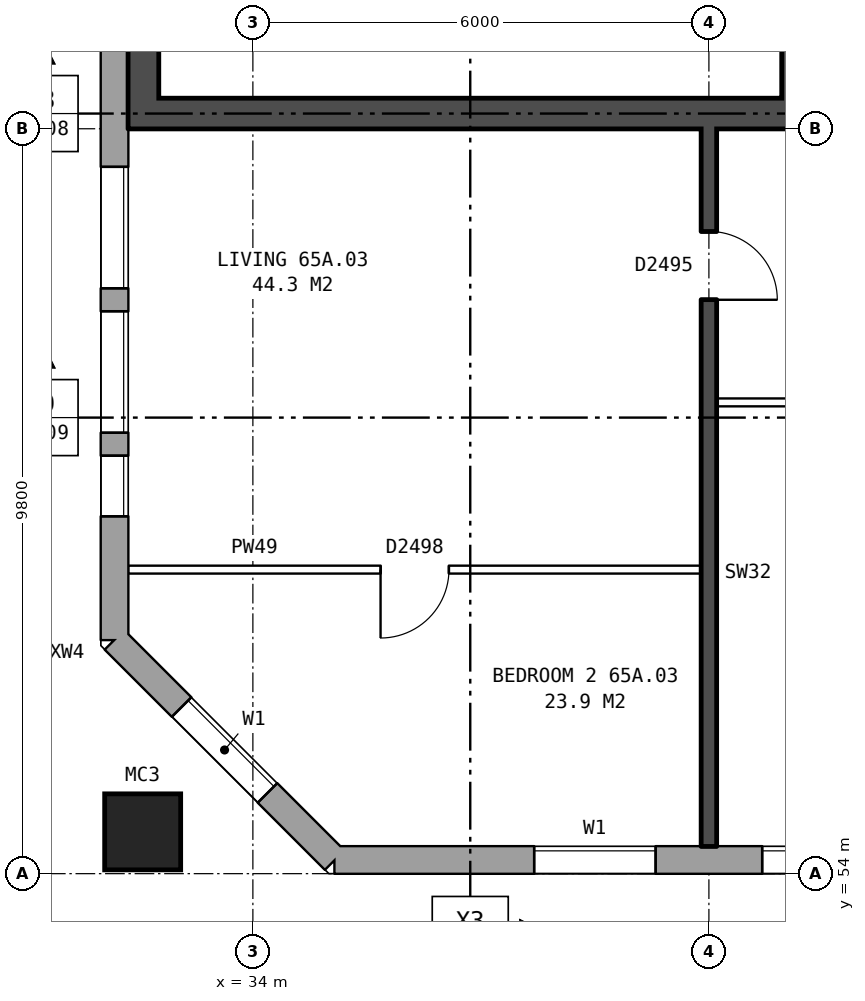
"""IFC4 building model, lengths in metres.
Left out: names, types, materials, properties, quantities, classifications, styles, units other than length and angle.
Written with IfcOpenShell. Run it as: python <this file> out.ifc"""

import sys

from ifc_helpers import new_model, si_unit, direction, frame, frame_2d, origin, origin_2d, place, context, subcontext, project, spatial, rectangle, hollow_rectangle, extrude, element, fill, save


model = new_model("IFC4")
c1 = context("Model", 3, precision=1e-05, world=origin(), true_north=direction((0.0, 1.0)))
c2 = subcontext(c1, "Body", "Model", "MODEL_VIEW")
j1 = project(units=[si_unit("LENGTHUNIT", "METRE"), si_unit("PLANEANGLEUNIT", "RADIAN")], contexts=[c1])
p1 = place(None, origin())
s1 = spatial("IfcSite", under=j1, at=p1, CompositionType="ELEMENT")
p2 = place(p1, origin())
s2 = spatial("IfcBuilding", under=s1, at=p2, CompositionType="ELEMENT")
p3 = place(p2, frame((0.0, 0.0, 230.7)))
s3 = spatial("IfcBuildingStorey", under=s2, at=p3, CompositionType="ELEMENT", Elevation=230.7)
p4 = place(p3, frame((32.55, 54.55, 0.0), z_axis=(0.0, 0.0, 1.0), x_axis=(1.0, 0.0, 0.0)))
e1 = element("IfcColumn", 1, at=p4, inside=s3, PredefinedType="COLUMN", context=c2, shape_type="SweptSolid", body=[
    extrude(hollow_rectangle(XDim=1.0, YDim=1.0, WallThickness=0.055, at=origin_2d()), origin(), (0.0, 0.0, 1.0), 3.1),
])
p5 = place(p3, frame((32.18, 57.075, 0.0), z_axis=(0.0, 0.0, 1.0), x_axis=(0.707106781187, -0.707106781187, 0.0)))
e2 = element("IfcWall", 2, at=p5, inside=s3, PredefinedType="STANDARD", context=c2, shape_type="SweptSolid", body=[
    extrude(rectangle(XDim=4.094, YDim=0.36, at=frame_2d((2.047, 0.0))), origin(), (0.0, 0.0, 1.0), 2.85),
])
p6 = place(p5, frame((1.247, 0.0, 0.8)))
e3 = element("IfcOpeningElement", 3, at=p6, cuts=e2, PredefinedType="OPENING", context=c2, shape_type="SweptSolid", body=[
    extrude(rectangle(XDim=1.6, YDim=1.8, at=frame_2d((0.8, 0.9))), frame((0.0, 0.19, 0.0), z_axis=(0.0, -1.0, 0.0), x_axis=(1.0, 0.0, 0.0)), (0.0, 0.0, 1.0), 0.38),
])
p7 = place(p3, frame((35.075, 54.18, 0.0), z_axis=(0.0, 0.0, 1.0), x_axis=(1.0, 0.0, 0.0)))
e4 = element("IfcWall", 4, at=p7, inside=s3, PredefinedType="STANDARD", context=c2, shape_type="SweptSolid", body=[
    extrude(rectangle(XDim=39.875, YDim=0.36, at=frame_2d((19.938, 0.0))), origin(), (0.0, 0.0, 1.0), 2.85),
])
p8 = place(p7, frame((2.625, 0.0, 0.8)))
e5 = element("IfcOpeningElement", 5, at=p8, cuts=e4, PredefinedType="OPENING", context=c2, shape_type="SweptSolid", body=[
    extrude(rectangle(XDim=1.6, YDim=1.8, at=frame_2d((0.8, 0.9))), frame((0.0, 0.19, 0.0), z_axis=(0.0, -1.0, 0.0), x_axis=(1.0, 0.0, 0.0)), (0.0, 0.0, 1.0), 0.38),
])
p9 = place(p7, frame((5.625, 0.0, 0.8)))
e6 = element("IfcOpeningElement", 6, at=p9, cuts=e4, PredefinedType="OPENING", context=c2, shape_type="SweptSolid", body=[
    extrude(rectangle(XDim=1.6, YDim=1.8, at=frame_2d((0.8, 0.9))), frame((0.0, 0.19, 0.0), z_axis=(0.0, -1.0, 0.0), x_axis=(1.0, 0.0, 0.0)), (0.0, 0.0, 1.0), 0.38),
])
p10 = place(p7, frame((8.625, 0.0, 0.8)))
e7 = element("IfcOpeningElement", 7, at=p10, cuts=e4, PredefinedType="OPENING", context=c2, shape_type="SweptSolid", body=[
    extrude(rectangle(XDim=1.6, YDim=1.8, at=frame_2d((0.8, 0.9))), frame((0.0, 0.19, 0.0), z_axis=(0.0, -1.0, 0.0), x_axis=(1.0, 0.0, 0.0)), (0.0, 0.0, 1.0), 0.38),
])
p11 = place(p7, frame((11.625, 0.0, 0.8)))
e8 = element("IfcOpeningElement", 8, at=p11, cuts=e4, PredefinedType="OPENING", context=c2, shape_type="SweptSolid", body=[
    extrude(rectangle(XDim=1.6, YDim=1.8, at=frame_2d((0.8, 0.9))), frame((0.0, 0.19, 0.0), z_axis=(0.0, -1.0, 0.0), x_axis=(1.0, 0.0, 0.0)), (0.0, 0.0, 1.0), 0.38),
])
p12 = place(p7, frame((14.075, 0.0, 0.8)))
e9 = element("IfcOpeningElement", 9, at=p12, cuts=e4, PredefinedType="OPENING", context=c2, shape_type="SweptSolid", body=[
    extrude(rectangle(XDim=1.0, YDim=1.8, at=frame_2d((0.5, 0.9))), frame((0.0, 0.19, 0.0), z_axis=(0.0, -1.0, 0.0), x_axis=(1.0, 0.0, 0.0)), (0.0, 0.0, 1.0), 0.38),
])
p13 = place(p7, frame((17.625, 0.0, 0.8)))
e10 = element("IfcOpeningElement", 10, at=p13, cuts=e4, PredefinedType="OPENING", context=c2, shape_type="SweptSolid", body=[
    extrude(rectangle(XDim=1.6, YDim=1.8, at=frame_2d((0.8, 0.9))), frame((0.0, 0.19, 0.0), z_axis=(0.0, -1.0, 0.0), x_axis=(1.0, 0.0, 0.0)), (0.0, 0.0, 1.0), 0.38),
])
p14 = place(p7, frame((20.125, 0.0, 0.8)))
e11 = element("IfcOpeningElement", 11, at=p14, cuts=e4, PredefinedType="OPENING", context=c2, shape_type="SweptSolid", body=[
    extrude(rectangle(XDim=0.6, YDim=1.2, at=frame_2d((0.3, 0.6))), frame((0.0, 0.19, 0.0), z_axis=(0.0, -1.0, 0.0), x_axis=(1.0, 0.0, 0.0)), (0.0, 0.0, 1.0), 0.38),
])
p15 = place(p7, frame((23.625, 0.0, 0.8)))
e12 = element("IfcOpeningElement", 12, at=p15, cuts=e4, PredefinedType="OPENING", context=c2, shape_type="SweptSolid", body=[
    extrude(rectangle(XDim=1.6, YDim=1.8, at=frame_2d((0.8, 0.9))), frame((0.0, 0.19, 0.0), z_axis=(0.0, -1.0, 0.0), x_axis=(1.0, 0.0, 0.0)), (0.0, 0.0, 1.0), 0.38),
])
p16 = place(p7, frame((26.625, 0.0, 0.8)))
e13 = element("IfcOpeningElement", 13, at=p16, cuts=e4, PredefinedType="OPENING", context=c2, shape_type="SweptSolid", body=[
    extrude(rectangle(XDim=1.6, YDim=1.8, at=frame_2d((0.8, 0.9))), frame((0.0, 0.19, 0.0), z_axis=(0.0, -1.0, 0.0), x_axis=(1.0, 0.0, 0.0)), (0.0, 0.0, 1.0), 0.38),
])
p17 = place(p7, frame((29.625, 0.0, 0.8)))
e14 = element("IfcOpeningElement", 14, at=p17, cuts=e4, PredefinedType="OPENING", context=c2, shape_type="SweptSolid", body=[
    extrude(rectangle(XDim=1.6, YDim=1.8, at=frame_2d((0.8, 0.9))), frame((0.0, 0.19, 0.0), z_axis=(0.0, -1.0, 0.0), x_axis=(1.0, 0.0, 0.0)), (0.0, 0.0, 1.0), 0.38),
])
p18 = place(p7, frame((32.625, 0.0, 0.8)))
e15 = element("IfcOpeningElement", 15, at=p18, cuts=e4, PredefinedType="OPENING", context=c2, shape_type="SweptSolid", body=[
    extrude(rectangle(XDim=1.6, YDim=1.8, at=frame_2d((0.8, 0.9))), frame((0.0, 0.19, 0.0), z_axis=(0.0, -1.0, 0.0), x_axis=(1.0, 0.0, 0.0)), (0.0, 0.0, 1.0), 0.38),
])
p19 = place(p7, frame((35.625, 0.0, 0.8)))
e16 = element("IfcOpeningElement", 16, at=p19, cuts=e4, PredefinedType="OPENING", context=c2, shape_type="SweptSolid", body=[
    extrude(rectangle(XDim=1.6, YDim=1.8, at=frame_2d((0.8, 0.9))), frame((0.0, 0.19, 0.0), z_axis=(0.0, -1.0, 0.0), x_axis=(1.0, 0.0, 0.0)), (0.0, 0.0, 1.0), 0.38),
])
p20 = place(p7, frame((22.125, 0.0, 1.7)))
e17 = element("IfcOpeningElement", 17, at=p20, cuts=e4, PredefinedType="OPENING", context=c2, shape_type="SweptSolid", body=[
    extrude(rectangle(XDim=0.6, YDim=0.9, at=frame_2d((0.3, 0.45))), frame((0.0, 0.19, 0.0), z_axis=(0.0, -1.0, 0.0), x_axis=(1.0, 0.0, 0.0)), (0.0, 0.0, 1.0), 0.38),
])
p21 = place(p3, frame((32.18, 82.925, 0.0), z_axis=(0.0, 0.0, 1.0), x_axis=(0.0, -1.0, 0.0)))
e18 = element("IfcWall", 18, at=p21, inside=s3, PredefinedType="STANDARD", context=c2, shape_type="SweptSolid", body=[
    extrude(rectangle(XDim=25.851, YDim=0.36, at=frame_2d((12.925, 0.0))), origin(), (0.0, 0.0, 1.0), 2.85),
])
p22 = place(p21, frame((1.575, 0.0, 1.7)))
e19 = element("IfcOpeningElement", 19, at=p22, cuts=e18, PredefinedType="OPENING", context=c2, shape_type="SweptSolid", body=[
    extrude(rectangle(XDim=0.8, YDim=0.9, at=frame_2d((0.4, 0.45))), frame((0.0, 0.19, 0.0), z_axis=(0.0, -1.0, 0.0), x_axis=(1.0, 0.0, 0.0)), (0.0, 0.0, 1.0), 0.38),
])
p23 = place(p21, frame((4.625, 0.0, 0.8)))
e20 = element("IfcOpeningElement", 20, at=p23, cuts=e18, PredefinedType="OPENING", context=c2, shape_type="SweptSolid", body=[
    extrude(rectangle(XDim=1.6, YDim=1.8, at=frame_2d((0.8, 0.9))), frame((0.0, 0.19, 0.0), z_axis=(0.0, -1.0, 0.0), x_axis=(1.0, 0.0, 0.0)), (0.0, 0.0, 1.0), 0.38),
])
p24 = place(p21, frame((19.625, 0.0, 0.8)))
e21 = element("IfcOpeningElement", 21, at=p24, cuts=e18, PredefinedType="OPENING", context=c2, shape_type="SweptSolid", body=[
    extrude(rectangle(XDim=1.6, YDim=1.8, at=frame_2d((0.8, 0.9))), frame((0.0, 0.19, 0.0), z_axis=(0.0, -1.0, 0.0), x_axis=(1.0, 0.0, 0.0)), (0.0, 0.0, 1.0), 0.38),
])
p25 = place(p21, frame((21.525, 0.0, 0.8)))
e22 = element("IfcOpeningElement", 22, at=p25, cuts=e18, PredefinedType="OPENING", context=c2, shape_type="SweptSolid", body=[
    extrude(rectangle(XDim=1.6, YDim=1.8, at=frame_2d((0.8, 0.9))), frame((0.0, 0.19, 0.0), z_axis=(0.0, -1.0, 0.0), x_axis=(1.0, 0.0, 0.0)), (0.0, 0.0, 1.0), 0.38),
])
p26 = place(p21, frame((2.675, 0.0, 0.8)))
e23 = element("IfcOpeningElement", 23, at=p26, cuts=e18, PredefinedType="OPENING", context=c2, shape_type="SweptSolid", body=[
    extrude(rectangle(XDim=1.6, YDim=1.8, at=frame_2d((0.8, 0.9))), frame((0.0, 0.19, 0.0), z_axis=(0.0, -1.0, 0.0), x_axis=(1.0, 0.0, 0.0)), (0.0, 0.0, 1.0), 0.38),
])
p27 = place(p21, frame((23.425, 0.0, 1.7)))
e24 = element("IfcOpeningElement", 24, at=p27, cuts=e18, PredefinedType="OPENING", context=c2, shape_type="SweptSolid", body=[
    extrude(rectangle(XDim=0.8, YDim=0.9, at=frame_2d((0.4, 0.45))), frame((0.0, 0.19, 0.0), z_axis=(0.0, -1.0, 0.0), x_axis=(1.0, 0.0, 0.0)), (0.0, 0.0, 1.0), 0.38),
])
p28 = place(p3, frame((41.16, 76.2, 0.0), z_axis=(0.0, 0.0, 1.0), x_axis=(0.0, -1.0, 0.0)))
e25 = element("IfcWall", 25, at=p28, inside=s3, PredefinedType="SHEAR", context=c2, shape_type="SweptSolid", body=[
    extrude(rectangle(XDim=12.4, YDim=0.4, at=frame_2d((6.2, 0.0))), origin(), (0.0, 0.0, 1.0), 2.85),
])
p29 = place(p28, frame((1.325, 0.0, 0.0)))
e26 = element("IfcOpeningElement", 26, at=p29, cuts=e25, PredefinedType="OPENING", context=c2, shape_type="SweptSolid", body=[
    extrude(rectangle(XDim=1.1, YDim=2.1, at=frame_2d((0.55, 1.05))), frame((0.0, 0.21, 0.0), z_axis=(0.0, -1.0, 0.0), x_axis=(1.0, 0.0, 0.0)), (0.0, 0.0, 1.0), 0.42),
])
p30 = place(p28, frame((4.225, 0.0, 0.0)))
e27 = element("IfcOpeningElement", 27, at=p30, cuts=e25, PredefinedType="OPENING", context=c2, shape_type="SweptSolid", body=[
    extrude(rectangle(XDim=0.85, YDim=2.1, at=frame_2d((0.425, 1.05))), frame((0.0, 0.21, 0.0), z_axis=(0.0, -1.0, 0.0), x_axis=(1.0, 0.0, 0.0)), (0.0, 0.0, 1.0), 0.42),
])
p31 = place(p28, frame((7.475, 0.0, 0.0)))
e28 = element("IfcOpeningElement", 28, at=p31, cuts=e25, PredefinedType="OPENING", context=c2, shape_type="SweptSolid", body=[
    extrude(rectangle(XDim=0.85, YDim=2.1, at=frame_2d((0.425, 1.05))), frame((0.0, 0.21, 0.0), z_axis=(0.0, -1.0, 0.0), x_axis=(1.0, 0.0, 0.0)), (0.0, 0.0, 1.0), 0.42),
])
p32 = place(p28, frame((9.9, 0.0, 0.0)))
e29 = element("IfcOpeningElement", 29, at=p32, cuts=e25, PredefinedType="OPENING", context=c2, shape_type="SweptSolid", body=[
    extrude(rectangle(XDim=1.1, YDim=2.1, at=frame_2d((0.55, 1.05))), frame((0.0, 0.21, 0.0), z_axis=(0.0, -1.0, 0.0), x_axis=(1.0, 0.0, 0.0)), (0.0, 0.0, 1.0), 0.42),
])
p33 = place(p3, frame((32.56, 76.2, 0.0), z_axis=(0.0, 0.0, 1.0), x_axis=(0.0, -1.0, 0.0)))
e30 = element("IfcWall", 30, at=p33, inside=s3, PredefinedType="SHEAR", context=c2, shape_type="SweptSolid", body=[
    extrude(rectangle(XDim=12.4, YDim=0.4, at=frame_2d((6.2, 0.0))), origin(), (0.0, 0.0, 1.0), 2.85),
])
p34 = place(p3, frame((40.96, 64.0, 0.0), z_axis=(0.0, 0.0, 1.0), x_axis=(-1.0, 0.0, 0.0)))
e31 = element("IfcWall", 31, at=p34, inside=s3, PredefinedType="SHEAR", context=c2, shape_type="SweptSolid", body=[
    extrude(rectangle(XDim=8.2, YDim=0.4, at=frame_2d((4.1, 0.0))), origin(), (0.0, 0.0, 1.0), 2.85),
])
p35 = place(p3, frame((32.36, 58.0, 0.0), z_axis=(0.0, 0.0, 1.0), x_axis=(1.0, 0.0, 0.0)))
e32 = element("IfcWall", 32, at=p35, inside=s3, PredefinedType="PARTITIONING", context=c2, shape_type="SweptSolid", body=[
    extrude(rectangle(XDim=7.54, YDim=0.1, at=frame_2d((3.77, 0.0))), origin(), (0.0, 0.0, 1.0), 2.85),
])
p36 = place(p35, frame((3.32, 0.0, 0.0)))
e33 = element("IfcOpeningElement", 33, at=p36, cuts=e32, PredefinedType="OPENING", context=c2, shape_type="SweptSolid", body=[
    extrude(rectangle(XDim=0.9, YDim=2.1, at=frame_2d((0.45, 1.05))), frame((0.0, 0.06, 0.0), z_axis=(0.0, -1.0, 0.0), x_axis=(1.0, 0.0, 0.0)), (0.0, 0.0, 1.0), 0.12),
])
p37 = place(p3, frame((40.1, 60.2, 0.0), z_axis=(0.0, 0.0, 1.0), x_axis=(1.0, 0.0, 0.0)))
e34 = element("IfcWall", 34, at=p37, inside=s3, PredefinedType="PARTITIONING", context=c2, shape_type="SweptSolid", body=[
    extrude(rectangle(XDim=5.8, YDim=0.1, at=frame_2d((2.9, 0.0))), origin(), (0.0, 0.0, 1.0), 2.85),
])
p38 = place(p37, frame((1.3, 0.0, 0.0)))
e35 = element("IfcOpeningElement", 35, at=p38, cuts=e34, PredefinedType="OPENING", context=c2, shape_type="SweptSolid", body=[
    extrude(rectangle(XDim=0.9, YDim=2.1, at=frame_2d((0.45, 1.05))), frame((0.0, 0.06, 0.0), z_axis=(0.0, -1.0, 0.0), x_axis=(1.0, 0.0, 0.0)), (0.0, 0.0, 1.0), 0.12),
])
p39 = place(p37, frame((4.2, 0.0, 0.0)))
e36 = element("IfcOpeningElement", 36, at=p39, cuts=e34, PredefinedType="OPENING", context=c2, shape_type="SweptSolid", body=[
    extrude(rectangle(XDim=0.9, YDim=2.1, at=frame_2d((0.45, 1.05))), frame((0.0, 0.06, 0.0), z_axis=(0.0, -1.0, 0.0), x_axis=(1.0, 0.0, 0.0)), (0.0, 0.0, 1.0), 0.12),
])
p40 = place(p3, frame((40.0, 54.36, 0.0), z_axis=(0.0, 0.0, 1.0), x_axis=(0.0, 1.0, 0.0)))
e37 = element("IfcWall", 37, at=p40, inside=s3, PredefinedType="SOLIDWALL", context=c2, shape_type="SweptSolid", body=[
    extrude(rectangle(XDim=9.44, YDim=0.2, at=frame_2d((4.72, 0.0))), origin(), (0.0, 0.0, 1.0), 2.85),
])
p41 = place(p40, frame((7.19, 0.0, 0.0)))
e38 = element("IfcOpeningElement", 38, at=p41, cuts=e37, PredefinedType="OPENING", context=c2, shape_type="SweptSolid", body=[
    extrude(rectangle(XDim=0.9, YDim=2.1, at=frame_2d((0.45, 1.05))), frame((0.0, 0.11, 0.0), z_axis=(0.0, -1.0, 0.0), x_axis=(1.0, 0.0, 0.0)), (0.0, 0.0, 1.0), 0.22),
])
p42 = place(p6, origin())
e39 = element("IfcWindow", 39, at=p42, inside=s3, PartitioningType="SINGLE_PANEL", PredefinedType="WINDOW", context=c2, shape_type="SweptSolid", body=[
    extrude(rectangle(XDim=1.6, YDim=1.8, at=frame_2d((0.8, 0.9))), frame((0.0, 0.15, 0.0), z_axis=(0.0, -1.0, 0.0), x_axis=(1.0, 0.0, 0.0)), (0.0, 0.0, 1.0), 0.06),
])
fill(e3, e39)
p43 = place(p8, origin())
e40 = element("IfcWindow", 40, at=p43, inside=s3, PartitioningType="SINGLE_PANEL", PredefinedType="WINDOW", context=c2, shape_type="SweptSolid", body=[
    extrude(rectangle(XDim=1.6, YDim=1.8, at=frame_2d((0.8, 0.9))), frame((0.0, 0.15, 0.0), z_axis=(0.0, -1.0, 0.0), x_axis=(1.0, 0.0, 0.0)), (0.0, 0.0, 1.0), 0.06),
])
fill(e5, e40)
p44 = place(p9, origin())
e41 = element("IfcWindow", 41, at=p44, inside=s3, PartitioningType="SINGLE_PANEL", PredefinedType="WINDOW", context=c2, shape_type="SweptSolid", body=[
    extrude(rectangle(XDim=1.6, YDim=1.8, at=frame_2d((0.8, 0.9))), frame((0.0, 0.15, 0.0), z_axis=(0.0, -1.0, 0.0), x_axis=(1.0, 0.0, 0.0)), (0.0, 0.0, 1.0), 0.06),
])
fill(e6, e41)
p45 = place(p24, origin())
e42 = element("IfcWindow", 42, at=p45, inside=s3, PartitioningType="SINGLE_PANEL", PredefinedType="WINDOW", context=c2, shape_type="SweptSolid", body=[
    extrude(rectangle(XDim=1.6, YDim=1.8, at=frame_2d((0.8, 0.9))), frame((0.0, 0.15, 0.0), z_axis=(0.0, -1.0, 0.0), x_axis=(1.0, 0.0, 0.0)), (0.0, 0.0, 1.0), 0.06),
])
fill(e21, e42)
p46 = place(p25, origin())
e43 = element("IfcWindow", 43, at=p46, inside=s3, PartitioningType="SINGLE_PANEL", PredefinedType="WINDOW", context=c2, shape_type="SweptSolid", body=[
    extrude(rectangle(XDim=1.6, YDim=1.8, at=frame_2d((0.8, 0.9))), frame((0.0, 0.15, 0.0), z_axis=(0.0, -1.0, 0.0), x_axis=(1.0, 0.0, 0.0)), (0.0, 0.0, 1.0), 0.06),
])
fill(e22, e43)
p47 = place(p36, frame((0.9, 0.0, 0.0), z_axis=(0.0, 0.0, 1.0), x_axis=(-1.0, 0.0, 0.0)))
e44 = element("IfcDoor", 44, at=p47, inside=s3, OperationType="SINGLE_SWING_RIGHT", PredefinedType="DOOR", context=c2, shape_type="SweptSolid", body=[
    extrude(rectangle(XDim=0.9, YDim=2.1, at=frame_2d((0.45, 1.05))), frame((0.0, 0.025, 0.0), z_axis=(0.0, -1.0, 0.0), x_axis=(1.0, 0.0, 0.0)), (0.0, 0.0, 1.0), 0.05),
])
fill(e33, e44)
p48 = place(p41, frame((0.9, 0.0, 0.0), z_axis=(0.0, 0.0, 1.0), x_axis=(-1.0, 0.0, 0.0)))
e45 = element("IfcDoor", 45, at=p48, inside=s3, OperationType="SINGLE_SWING_RIGHT", PredefinedType="DOOR", context=c2, shape_type="SweptSolid", body=[
    extrude(rectangle(XDim=0.9, YDim=2.1, at=frame_2d((0.45, 1.05))), frame((0.0, 0.025, 0.0), z_axis=(0.0, -1.0, 0.0), x_axis=(1.0, 0.0, 0.0)), (0.0, 0.0, 1.0), 0.05),
])
fill(e38, e45)
p49 = place(p27, origin())
e46 = element("IfcWindow", 46, at=p49, inside=s3, PartitioningType="SINGLE_PANEL", PredefinedType="WINDOW", context=c2, shape_type="SweptSolid", body=[
    extrude(rectangle(XDim=0.8, YDim=0.9, at=frame_2d((0.4, 0.45))), frame((0.0, 0.15, 0.0), z_axis=(0.0, -1.0, 0.0), x_axis=(1.0, 0.0, 0.0)), (0.0, 0.0, 1.0), 0.06),
])
fill(e24, e46)
save(model, sys.argv[1])
